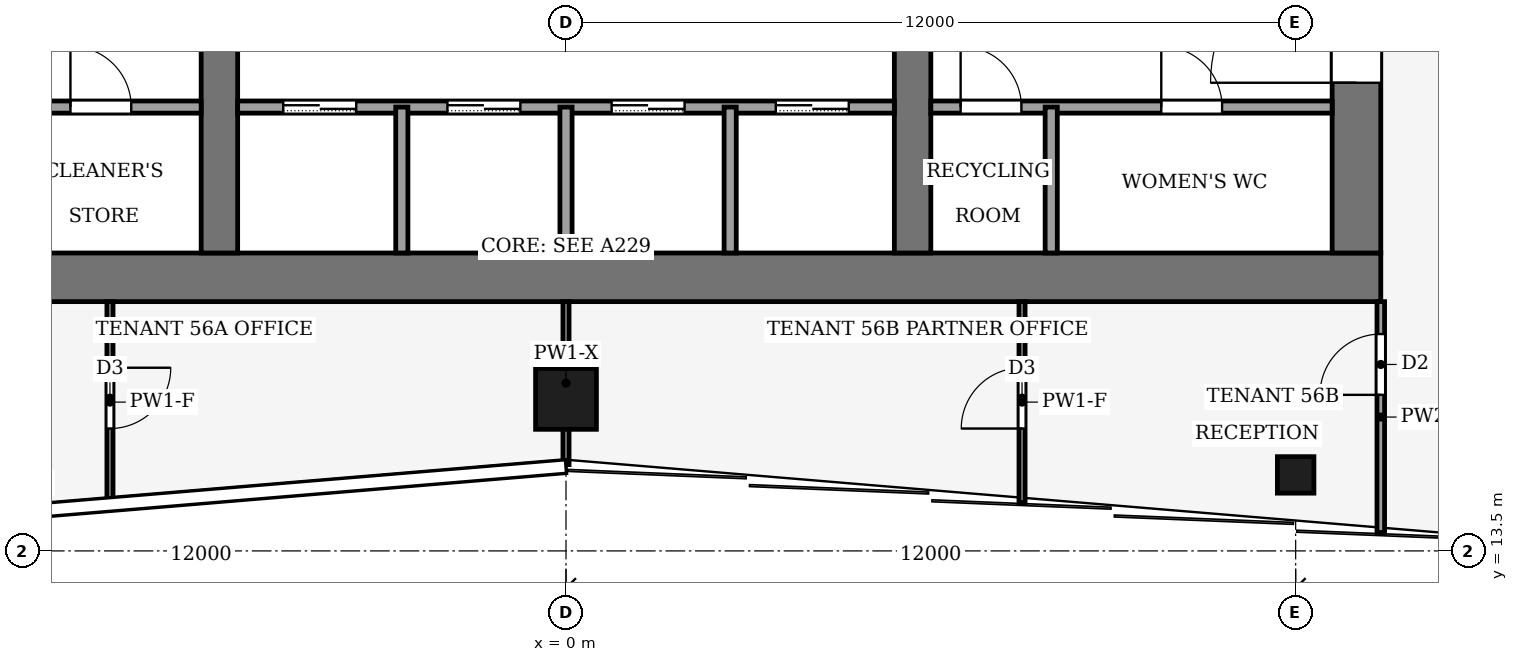
"""IFC4 building model, lengths in metres.
Left out: names, types, materials, properties, quantities, classifications, styles, units other than length and angle.
Written with IfcOpenShell. Run it as: python <this file> out.ifc"""

import sys

from ifc_helpers import new_model, si_unit, direction, frame, frame_2d, origin, origin_2d, place, context, subcontext, project, spatial, rectangle, hollow_rectangle, extrude, element, fill, save


model = new_model("IFC4")
c1 = context("Model", 3, precision=1e-05, world=origin(), true_north=direction((0.0, 1.0)))
c2 = subcontext(c1, "Body", "Model", "MODEL_VIEW")
j1 = project(units=[si_unit("LENGTHUNIT", "METRE"), si_unit("PLANEANGLEUNIT", "RADIAN")], contexts=[c1])
p1 = place(None, origin())
s1 = spatial("IfcSite", under=j1, at=p1, CompositionType="ELEMENT")
p2 = place(p1, origin())
s2 = spatial("IfcBuilding", under=s1, at=p2, CompositionType="ELEMENT")
p3 = place(p2, frame((0.0, 0.0, 246.0)))
s3 = spatial("IfcBuildingStorey", under=s2, at=p3, CompositionType="ELEMENT", Elevation=246.0)
p4 = place(p3, frame((-13.4, 18.0, -0.13), z_axis=(0.0, 0.0, 1.0), x_axis=(1.0, 0.0, 0.0)))
e1 = element("IfcWall", 1, at=p4, inside=s3, PredefinedType="SHEAR", context=c2, shape_type="SweptSolid", body=[
    extrude(rectangle(XDim=26.8, YDim=0.8, at=frame_2d((13.4, 0.0))), origin(), (0.0, 0.0, 1.0), 4.0),
])
p5 = place(p3, frame((13.0, 18.4, -0.13), z_axis=(0.0, 0.0, 1.0), x_axis=(0.0, 1.0, 0.0)))
e2 = element("IfcWall", 2, at=p5, inside=s3, PredefinedType="SHEAR", context=c2, shape_type="SweptSolid", body=[
    extrude(rectangle(XDim=19.2, YDim=0.8, at=frame_2d((9.6, 0.0))), origin(), (0.0, 0.0, 1.0), 4.0),
])
p6 = place(p5, frame((2.8, 0.0, 0.13)))
e3 = element("IfcOpeningElement", 3, at=p6, cuts=e2, PredefinedType="OPENING", context=c2, shape_type="SweptSolid", body=[
    extrude(rectangle(XDim=2.4, YDim=2.4, at=frame_2d((1.2, 1.2))), frame((0.0, 0.41, 0.0), z_axis=(0.0, -1.0, 0.0), x_axis=(1.0, 0.0, 0.0)), (0.0, 0.0, 1.0), 0.82),
])
p7 = place(p5, frame((13.3, 0.0, 0.13)))
e4 = element("IfcOpeningElement", 4, at=p7, cuts=e2, PredefinedType="OPENING", context=c2, shape_type="SweptSolid", body=[
    extrude(rectangle(XDim=2.4, YDim=2.4, at=frame_2d((1.2, 1.2))), frame((0.0, 0.41, 0.0), z_axis=(0.0, -1.0, 0.0), x_axis=(1.0, 0.0, 0.0)), (0.0, 0.0, 1.0), 0.82),
])
p8 = place(p3, frame((-5.7, 18.4, -0.13), z_axis=(0.0, 0.0, 1.0), x_axis=(0.0, 1.0, 0.0)))
e5 = element("IfcWall", 5, at=p8, inside=s3, PredefinedType="SHEAR", context=c2, shape_type="SweptSolid", body=[
    extrude(rectangle(XDim=19.2, YDim=0.6, at=frame_2d((9.6, 0.0))), origin(), (0.0, 0.0, 1.0), 4.0),
])
p9 = place(p8, frame((8.35, 0.0, 0.13)))
e6 = element("IfcOpeningElement", 6, at=p9, cuts=e5, PredefinedType="OPENING", context=c2, shape_type="SweptSolid", body=[
    extrude(rectangle(XDim=0.9, YDim=2.1, at=frame_2d((0.45, 1.05))), frame((0.0, 0.31, 0.0), z_axis=(0.0, -1.0, 0.0), x_axis=(1.0, 0.0, 0.0)), (0.0, 0.0, 1.0), 0.62),
])
p10 = place(p3, frame((5.7, 18.4, -0.13), z_axis=(0.0, 0.0, 1.0), x_axis=(0.0, 1.0, 0.0)))
e7 = element("IfcWall", 7, at=p10, inside=s3, PredefinedType="SHEAR", context=c2, shape_type="SweptSolid", body=[
    extrude(rectangle(XDim=19.2, YDim=0.6, at=frame_2d((9.6, 0.0))), origin(), (0.0, 0.0, 1.0), 4.0),
])
p11 = place(p10, frame((8.35, 0.0, 0.13)))
e8 = element("IfcOpeningElement", 8, at=p11, cuts=e7, PredefinedType="OPENING", context=c2, shape_type="SweptSolid", body=[
    extrude(rectangle(XDim=0.9, YDim=2.1, at=frame_2d((0.45, 1.05))), frame((0.0, 0.31, 0.0), z_axis=(0.0, -1.0, 0.0), x_axis=(1.0, 0.0, 0.0)), (0.0, 0.0, 1.0), 0.62),
])
p12 = place(p10, frame((13.3, 0.0, 0.13)))
e9 = element("IfcOpeningElement", 9, at=p12, cuts=e7, PredefinedType="OPENING", context=c2, shape_type="SweptSolid", body=[
    extrude(rectangle(XDim=2.4, YDim=2.4, at=frame_2d((1.2, 1.2))), frame((0.0, 0.31, 0.0), z_axis=(0.0, -1.0, 0.0), x_axis=(1.0, 0.0, 0.0)), (0.0, 0.0, 1.0), 0.62),
])
p13 = place(p3, frame((0.0, 16.0, 0.0), z_axis=(0.0, 0.0, 1.0), x_axis=(1.0, 0.0, 0.0)))
e10 = element("IfcColumn", 10, at=p13, inside=s3, PredefinedType="COLUMN", context=c2, shape_type="SweptSolid", body=[
    extrude(hollow_rectangle(XDim=1.0, YDim=1.0, WallThickness=0.045, at=origin_2d()), origin(), (0.0, 0.0, 1.0), 4.0),
])
p14 = place(p3, frame((12.0, 14.75, 0.0), z_axis=(0.0, 0.0, 1.0), x_axis=(1.0, 0.0, 0.0)))
e11 = element("IfcColumn", 11, at=p14, inside=s3, PredefinedType="COLUMN", context=c2, shape_type="SweptSolid", body=[
    extrude(hollow_rectangle(XDim=0.6, YDim=0.6, WallThickness=0.025, at=origin_2d()), origin(), (0.0, 0.0, 1.0), 4.0),
])
p15 = place(p3, frame((-12.6, 20.8, 0.0), z_axis=(0.0, 0.0, 1.0), x_axis=(1.0, 0.0, 0.0)))
e12 = element("IfcWall", 12, at=p15, inside=s3, PredefinedType="PARTITIONING", context=c2, shape_type="SweptSolid", body=[
    extrude(rectangle(XDim=6.6, YDim=0.2, at=frame_2d((3.3, 0.0))), origin(), (0.0, 0.0, 1.0), 3.87),
])
p16 = place(p15, frame((1.15, 0.0, 0.0)))
e13 = element("IfcOpeningElement", 13, at=p16, cuts=e12, PredefinedType="OPENING", context=c2, shape_type="SweptSolid", body=[
    extrude(rectangle(XDim=1.0, YDim=2.1, at=frame_2d((0.5, 1.05))), frame((0.0, 0.11, 0.0), z_axis=(0.0, -1.0, 0.0), x_axis=(1.0, 0.0, 0.0)), (0.0, 0.0, 1.0), 0.22),
])
p17 = place(p15, frame((4.45, 0.0, 0.0)))
e14 = element("IfcOpeningElement", 14, at=p17, cuts=e12, PredefinedType="OPENING", context=c2, shape_type="SweptSolid", body=[
    extrude(rectangle(XDim=1.0, YDim=2.1, at=frame_2d((0.5, 1.05))), frame((0.0, 0.11, 0.0), z_axis=(0.0, -1.0, 0.0), x_axis=(1.0, 0.0, 0.0)), (0.0, 0.0, 1.0), 0.22),
])
p18 = place(p3, frame((-5.4, 20.8, 0.0), z_axis=(0.0, 0.0, 1.0), x_axis=(1.0, 0.0, 0.0)))
e15 = element("IfcWall", 15, at=p18, inside=s3, PredefinedType="PARTITIONING", context=c2, shape_type="SweptSolid", body=[
    extrude(rectangle(XDim=10.8, YDim=0.2, at=frame_2d((5.4, 0.0))), origin(), (0.0, 0.0, 1.0), 3.87),
])
p19 = place(p18, frame((0.75, 0.0, 0.0)))
e16 = element("IfcOpeningElement", 16, at=p19, cuts=e15, PredefinedType="OPENING", context=c2, shape_type="SweptSolid", body=[
    extrude(rectangle(XDim=1.2, YDim=2.2, at=frame_2d((0.6, 1.1))), frame((0.0, 0.11, 0.0), z_axis=(0.0, -1.0, 0.0), x_axis=(1.0, 0.0, 0.0)), (0.0, 0.0, 1.0), 0.22),
])
p20 = place(p18, frame((3.45, 0.0, 0.0)))
e17 = element("IfcOpeningElement", 17, at=p20, cuts=e15, PredefinedType="OPENING", context=c2, shape_type="SweptSolid", body=[
    extrude(rectangle(XDim=1.2, YDim=2.2, at=frame_2d((0.6, 1.1))), frame((0.0, 0.11, 0.0), z_axis=(0.0, -1.0, 0.0), x_axis=(1.0, 0.0, 0.0)), (0.0, 0.0, 1.0), 0.22),
])
p21 = place(p18, frame((6.15, 0.0, 0.0)))
e18 = element("IfcOpeningElement", 18, at=p21, cuts=e15, PredefinedType="OPENING", context=c2, shape_type="SweptSolid", body=[
    extrude(rectangle(XDim=1.2, YDim=2.2, at=frame_2d((0.6, 1.1))), frame((0.0, 0.11, 0.0), z_axis=(0.0, -1.0, 0.0), x_axis=(1.0, 0.0, 0.0)), (0.0, 0.0, 1.0), 0.22),
])
p22 = place(p18, frame((8.85, 0.0, 0.0)))
e19 = element("IfcOpeningElement", 19, at=p22, cuts=e15, PredefinedType="OPENING", context=c2, shape_type="SweptSolid", body=[
    extrude(rectangle(XDim=1.2, YDim=2.2, at=frame_2d((0.6, 1.1))), frame((0.0, 0.11, 0.0), z_axis=(0.0, -1.0, 0.0), x_axis=(1.0, 0.0, 0.0)), (0.0, 0.0, 1.0), 0.22),
])
p23 = place(p3, frame((6.0, 20.8, 0.0), z_axis=(0.0, 0.0, 1.0), x_axis=(1.0, 0.0, 0.0)))
e20 = element("IfcWall", 20, at=p23, inside=s3, PredefinedType="PARTITIONING", context=c2, shape_type="SweptSolid", body=[
    extrude(rectangle(XDim=6.6, YDim=0.2, at=frame_2d((3.3, 0.0))), origin(), (0.0, 0.0, 1.0), 3.87),
])
p24 = place(p23, frame((0.49, 0.0, 0.0)))
e21 = element("IfcOpeningElement", 21, at=p24, cuts=e20, PredefinedType="OPENING", context=c2, shape_type="SweptSolid", body=[
    extrude(rectangle(XDim=1.0, YDim=2.1, at=frame_2d((0.5, 1.05))), frame((0.0, 0.11, 0.0), z_axis=(0.0, -1.0, 0.0), x_axis=(1.0, 0.0, 0.0)), (0.0, 0.0, 1.0), 0.22),
])
p25 = place(p23, frame((3.79, 0.0, 0.0)))
e22 = element("IfcOpeningElement", 22, at=p25, cuts=e20, PredefinedType="OPENING", context=c2, shape_type="SweptSolid", body=[
    extrude(rectangle(XDim=1.0, YDim=2.1, at=frame_2d((0.5, 1.05))), frame((0.0, 0.11, 0.0), z_axis=(0.0, -1.0, 0.0), x_axis=(1.0, 0.0, 0.0)), (0.0, 0.0, 1.0), 0.22),
])
for number, where, z_axis, x_axis in (
    (23, (-2.7, 18.4, 0.0), (0.0, 0.0, 1.0), (0.0, 1.0, 0.0)),
    (24, (0.0, 18.4, 0.0), (0.0, 0.0, 1.0), (0.0, 1.0, 0.0)),
    (25, (2.7, 18.4, 0.0), (0.0, 0.0, 1.0), (0.0, 1.0, 0.0)),
    (26, (7.98, 18.4, 0.0), (0.0, 0.0, 1.0), (0.0, 1.0, 0.0)),
):
    element("IfcWall", number, at=place(p3, frame(where, z_axis=z_axis, x_axis=x_axis)), inside=s3, PredefinedType="PARTITIONING", context=c2, shape_type="SweptSolid", body=[
        extrude(rectangle(XDim=2.4, YDim=0.2, at=frame_2d((1.2, 0.0))), origin(), (0.0, 0.0, 1.0), 3.87),
    ])
p26 = place(p3, frame((13.4, 13.803, 0.0), z_axis=(0.0, 0.0, 1.0), x_axis=(0.0, 1.0, 0.0)))
e27 = element("IfcWall", 27, at=p26, inside=s3, PredefinedType="PARTITIONING", context=c2, shape_type="SweptSolid", body=[
    extrude(rectangle(XDim=3.797, YDim=0.125, at=frame_2d((1.898, 0.0))), origin(), (0.0, 0.0, 1.0), 3.04),
])
p27 = place(p26, frame((2.263, 0.0, 0.0)))
e28 = element("IfcOpeningElement", 28, at=p27, cuts=e27, PredefinedType="OPENING", context=c2, shape_type="SweptSolid", body=[
    extrude(rectangle(XDim=1.0, YDim=2.1, at=frame_2d((0.5, 1.05))), frame((0.0, 0.073, 0.0), z_axis=(0.0, -1.0, 0.0), x_axis=(1.0, 0.0, 0.0)), (0.0, 0.0, 1.0), 0.145),
])
p28 = place(p3, frame((-7.5, 17.6, 0.0), z_axis=(0.0, 0.0, 1.0), x_axis=(0.0, -1.0, 0.0)))
e29 = element("IfcWall", 29, at=p28, inside=s3, PredefinedType="PARTITIONING", context=c2, shape_type="SweptSolid", body=[
    extrude(rectangle(XDim=3.305, YDim=0.1, at=frame_2d((1.653, 0.0))), origin(), (0.0, 0.0, 1.0), 3.04),
])
p29 = place(p28, frame((1.087, 0.0, 0.0)))
e30 = element("IfcOpeningElement", 30, at=p29, cuts=e29, PredefinedType="OPENING", context=c2, shape_type="SweptSolid", body=[
    extrude(rectangle(XDim=1.0, YDim=2.1, at=frame_2d((0.5, 1.05))), frame((0.0, 0.06, 0.0), z_axis=(0.0, -1.0, 0.0), x_axis=(1.0, 0.0, 0.0)), (0.0, 0.0, 1.0), 0.12),
])
p30 = place(p3, frame((0.0, 14.92, 0.0), z_axis=(0.0, 0.0, 1.0), x_axis=(0.0, 1.0, 0.0)))
e31 = element("IfcWall", 31, at=p30, inside=s3, PredefinedType="PARTITIONING", context=c2, shape_type="SweptSolid", body=[
    extrude(rectangle(XDim=2.68, YDim=0.1, at=frame_2d((1.34, 0.0))), origin(), (0.0, 0.0, 1.0), 3.54),
])
p31 = place(p3, frame((7.5, 14.295, 0.0), z_axis=(0.0, 0.0, 1.0), x_axis=(0.0, 1.0, 0.0)))
e32 = element("IfcWall", 32, at=p31, inside=s3, PredefinedType="PARTITIONING", context=c2, shape_type="SweptSolid", body=[
    extrude(rectangle(XDim=3.305, YDim=0.1, at=frame_2d((1.653, 0.0))), origin(), (0.0, 0.0, 1.0), 3.04),
])
p32 = place(p31, frame((1.218, 0.0, 0.0)))
e33 = element("IfcOpeningElement", 33, at=p32, cuts=e32, PredefinedType="OPENING", context=c2, shape_type="SweptSolid", body=[
    extrude(rectangle(XDim=1.0, YDim=2.1, at=frame_2d((0.5, 1.05))), frame((0.0, 0.06, 0.0), z_axis=(0.0, -1.0, 0.0), x_axis=(1.0, 0.0, 0.0)), (0.0, 0.0, 1.0), 0.12),
])
p33 = place(p19, origin())
e34 = element("IfcDoor", 34, at=p33, inside=s3, OperationType="SLIDING_TO_LEFT", PredefinedType="DOOR", context=c2, shape_type="SweptSolid", body=[
    extrude(rectangle(XDim=1.2, YDim=2.2, at=frame_2d((0.6, 1.1))), frame((0.0, 0.025, 0.0), z_axis=(0.0, -1.0, 0.0), x_axis=(1.0, 0.0, 0.0)), (0.0, 0.0, 1.0), 0.05),
])
fill(e16, e34)
p34 = place(p20, origin())
e35 = element("IfcDoor", 35, at=p34, inside=s3, OperationType="SLIDING_TO_LEFT", PredefinedType="DOOR", context=c2, shape_type="SweptSolid", body=[
    extrude(rectangle(XDim=1.2, YDim=2.2, at=frame_2d((0.6, 1.1))), frame((0.0, 0.025, 0.0), z_axis=(0.0, -1.0, 0.0), x_axis=(1.0, 0.0, 0.0)), (0.0, 0.0, 1.0), 0.05),
])
fill(e17, e35)
p35 = place(p21, origin())
e36 = element("IfcDoor", 36, at=p35, inside=s3, OperationType="SLIDING_TO_LEFT", PredefinedType="DOOR", context=c2, shape_type="SweptSolid", body=[
    extrude(rectangle(XDim=1.2, YDim=2.2, at=frame_2d((0.6, 1.1))), frame((0.0, 0.025, 0.0), z_axis=(0.0, -1.0, 0.0), x_axis=(1.0, 0.0, 0.0)), (0.0, 0.0, 1.0), 0.05),
])
fill(e18, e36)
p36 = place(p22, origin())
e37 = element("IfcDoor", 37, at=p36, inside=s3, OperationType="SLIDING_TO_LEFT", PredefinedType="DOOR", context=c2, shape_type="SweptSolid", body=[
    extrude(rectangle(XDim=1.2, YDim=2.2, at=frame_2d((0.6, 1.1))), frame((0.0, 0.025, 0.0), z_axis=(0.0, -1.0, 0.0), x_axis=(1.0, 0.0, 0.0)), (0.0, 0.0, 1.0), 0.05),
])
fill(e19, e37)
p37 = place(p17, origin())
e38 = element("IfcDoor", 38, at=p37, inside=s3, OperationType="SINGLE_SWING_LEFT", PredefinedType="DOOR", context=c2, shape_type="SweptSolid", body=[
    extrude(rectangle(XDim=1.0, YDim=2.1, at=frame_2d((0.5, 1.05))), frame((0.0, 0.025, 0.0), z_axis=(0.0, -1.0, 0.0), x_axis=(1.0, 0.0, 0.0)), (0.0, 0.0, 1.0), 0.05),
])
fill(e14, e38)
p38 = place(p24, origin())
e39 = element("IfcDoor", 39, at=p38, inside=s3, OperationType="SINGLE_SWING_RIGHT", PredefinedType="DOOR", context=c2, shape_type="SweptSolid", body=[
    extrude(rectangle(XDim=1.0, YDim=2.1, at=frame_2d((0.5, 1.05))), frame((0.0, 0.025, 0.0), z_axis=(0.0, -1.0, 0.0), x_axis=(1.0, 0.0, 0.0)), (0.0, 0.0, 1.0), 0.05),
])
fill(e21, e39)
p39 = place(p25, origin())
e40 = element("IfcDoor", 40, at=p39, inside=s3, OperationType="SINGLE_SWING_RIGHT", PredefinedType="DOOR", context=c2, shape_type="SweptSolid", body=[
    extrude(rectangle(XDim=1.0, YDim=2.1, at=frame_2d((0.5, 1.05))), frame((0.0, 0.025, 0.0), z_axis=(0.0, -1.0, 0.0), x_axis=(1.0, 0.0, 0.0)), (0.0, 0.0, 1.0), 0.05),
])
fill(e22, e40)
p40 = place(p6, origin())
e41 = element("IfcDoor", 41, at=p40, inside=s3, OperationType="DOUBLE_DOOR_SINGLE_SWING", PredefinedType="DOOR", context=c2, shape_type="SweptSolid", body=[
    extrude(rectangle(XDim=2.4, YDim=2.4, at=frame_2d((1.2, 1.2))), frame((0.0, 0.025, 0.0), z_axis=(0.0, -1.0, 0.0), x_axis=(1.0, 0.0, 0.0)), (0.0, 0.0, 1.0), 0.05),
])
fill(e3, e41)
p41 = place(p27, origin())
e42 = element("IfcDoor", 42, at=p41, inside=s3, OperationType="SINGLE_SWING_RIGHT", PredefinedType="DOOR", context=c2, shape_type="SweptSolid", body=[
    extrude(rectangle(XDim=1.0, YDim=2.1, at=frame_2d((0.5, 1.05))), frame((0.0, 0.025, 0.0), z_axis=(0.0, -1.0, 0.0), x_axis=(1.0, 0.0, 0.0)), (0.0, 0.0, 1.0), 0.05),
])
fill(e28, e42)
p42 = place(p29, origin())
e43 = element("IfcDoor", 43, at=p42, inside=s3, OperationType="SINGLE_SWING_LEFT", PredefinedType="DOOR", context=c2, shape_type="SweptSolid", body=[
    extrude(rectangle(XDim=1.0, YDim=2.1, at=frame_2d((0.5, 1.05))), frame((0.0, 0.025, 0.0), z_axis=(0.0, -1.0, 0.0), x_axis=(1.0, 0.0, 0.0)), (0.0, 0.0, 1.0), 0.05),
])
fill(e30, e43)
p43 = place(p32, origin())
e44 = element("IfcDoor", 44, at=p43, inside=s3, OperationType="SINGLE_SWING_RIGHT", PredefinedType="DOOR", context=c2, shape_type="SweptSolid", body=[
    extrude(rectangle(XDim=1.0, YDim=2.1, at=frame_2d((0.5, 1.05))), frame((0.0, 0.025, 0.0), z_axis=(0.0, -1.0, 0.0), x_axis=(1.0, 0.0, 0.0)), (0.0, 0.0, 1.0), 0.05),
])
fill(e33, e44)
save(model, sys.argv[1])
